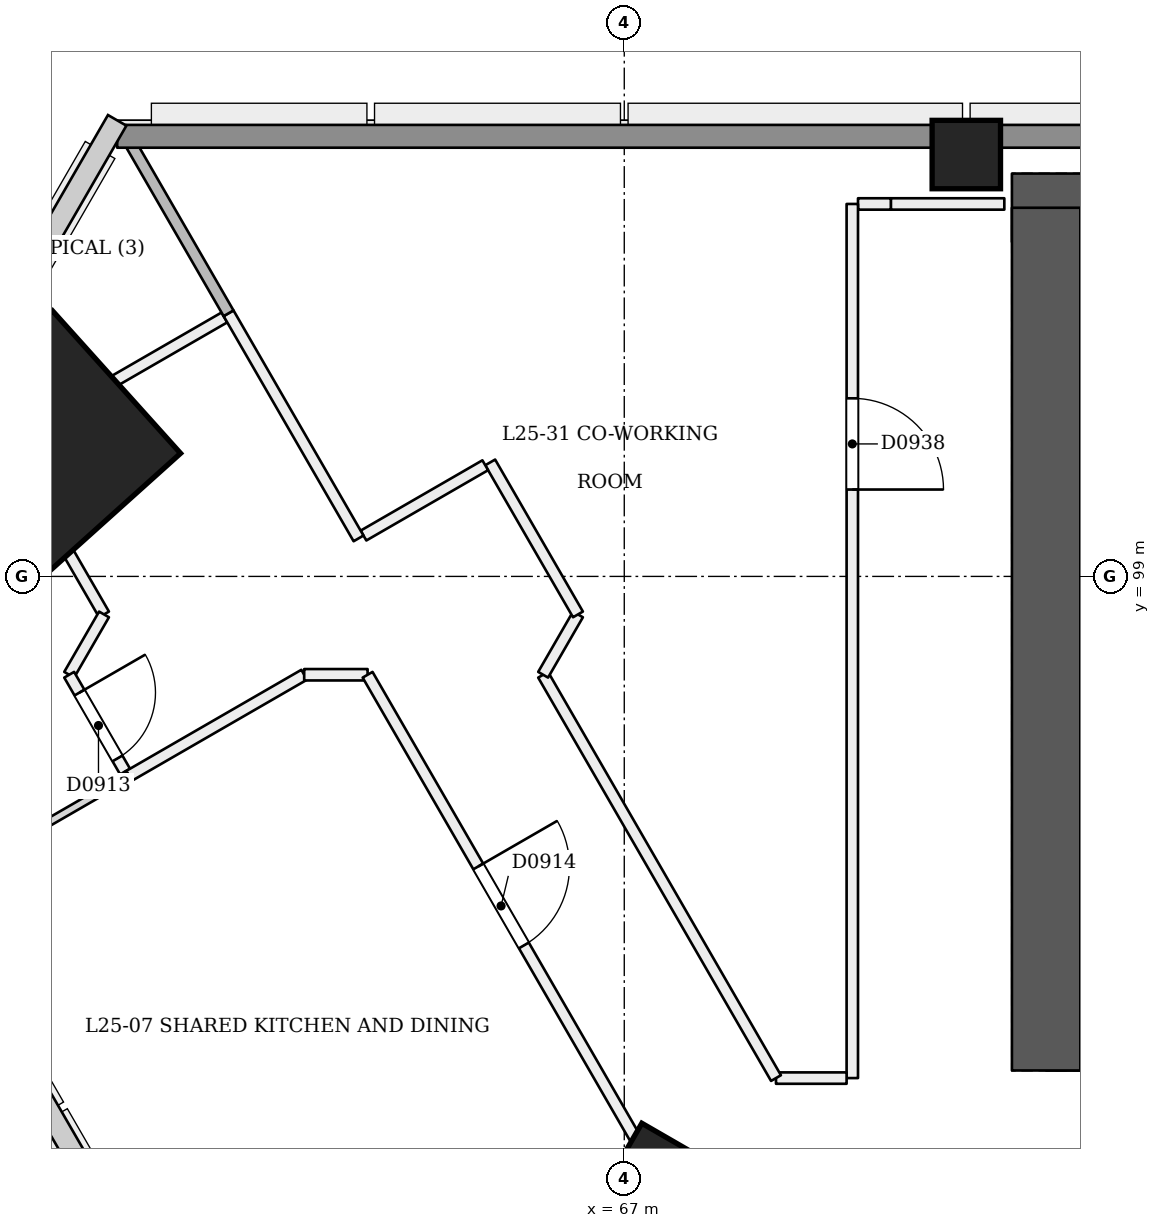
"""IFC4 building model, lengths in metres.
Left out: names, types, materials, properties, quantities, classifications, styles, units other than length and angle.
Written with IfcOpenShell. Run it as: python <this file> out.ifc"""

import sys

from ifc_helpers import new_model, si_unit, direction, frame, frame_2d, origin, origin_2d, place, context, subcontext, project, spatial, rectangle, extrude, element, fill, save


model = new_model("IFC4")
c1 = context("Model", 3, precision=1e-05, world=origin(), true_north=direction((0.0, 1.0)))
c2 = subcontext(c1, "Body", "Model", "MODEL_VIEW")
j1 = project(units=[si_unit("LENGTHUNIT", "METRE"), si_unit("PLANEANGLEUNIT", "RADIAN")], contexts=[c1])
p1 = place(None, origin())
s1 = spatial("IfcSite", under=j1, at=p1, CompositionType="ELEMENT")
p2 = place(p1, origin())
s2 = spatial("IfcBuilding", under=s1, at=p2, CompositionType="ELEMENT")
p3 = place(p2, frame((0.0, 0.0, 100.8)))
s3 = spatial("IfcBuildingStorey", under=s2, at=p3, CompositionType="ELEMENT", Elevation=100.8)
p4 = place(p3, frame((72.55, 92.95, 0.0), z_axis=(0.0, 0.0, 1.0), x_axis=(1.0, 0.0, 0.0)))
e1 = element("IfcWall", 1, at=p4, inside=s3, PredefinedType="SHEAR", context=c2, shape_type="SweptSolid", body=[
    extrude(rectangle(XDim=25.35, YDim=0.9, at=frame_2d((12.675, 0.0))), origin(), (0.0, 0.0, 1.0), 3.6),
])
p5 = place(p4, frame((1.25, 0.0, 0.0)))
e2 = element("IfcOpeningElement", 2, at=p5, cuts=e1, PredefinedType="OPENING", context=c2, shape_type="SweptSolid", body=[
    extrude(rectangle(XDim=1.2, YDim=2.1, at=frame_2d((0.6, 1.05))), frame((0.0, 0.46, 0.0), z_axis=(0.0, -1.0, 0.0), x_axis=(1.0, 0.0, 0.0)), (0.0, 0.0, 1.0), 0.921),
])
p6 = place(p4, frame((3.45, 0.0, 0.0)))
e3 = element("IfcOpeningElement", 3, at=p6, cuts=e1, PredefinedType="OPENING", context=c2, shape_type="SweptSolid", body=[
    extrude(rectangle(XDim=1.2, YDim=2.1, at=frame_2d((0.6, 1.05))), frame((0.0, 0.46, 0.0), z_axis=(0.0, -1.0, 0.0), x_axis=(1.0, 0.0, 0.0)), (0.0, 0.0, 1.0), 0.921),
])
p7 = place(p4, frame((13.45, 0.0, 0.0)))
e4 = element("IfcOpeningElement", 4, at=p7, cuts=e1, PredefinedType="OPENING", context=c2, shape_type="SweptSolid", body=[
    extrude(rectangle(XDim=1.2, YDim=2.1, at=frame_2d((0.6, 1.05))), frame((0.0, 0.46, 0.0), z_axis=(0.0, -1.0, 0.0), x_axis=(1.0, 0.0, 0.0)), (0.0, 0.0, 1.0), 0.921),
])
p8 = place(p4, frame((16.163, 0.0, 0.0)))
e5 = element("IfcOpeningElement", 5, at=p8, cuts=e1, PredefinedType="OPENING", context=c2, shape_type="SweptSolid", body=[
    extrude(rectangle(XDim=1.0, YDim=2.1, at=frame_2d((0.5, 1.05))), frame((0.0, 0.46, 0.0), z_axis=(0.0, -1.0, 0.0), x_axis=(1.0, 0.0, 0.0)), (0.0, 0.0, 1.0), 0.921),
])
p9 = place(p4, frame((20.05, 0.0, 0.0)))
e6 = element("IfcOpeningElement", 6, at=p9, cuts=e1, PredefinedType="OPENING", context=c2, shape_type="SweptSolid", body=[
    extrude(rectangle(XDim=1.0, YDim=2.1, at=frame_2d((0.5, 1.05))), frame((0.0, 0.46, 0.0), z_axis=(0.0, -1.0, 0.0), x_axis=(1.0, 0.0, 0.0)), (0.0, 0.0, 1.0), 0.921),
])
p10 = place(p4, frame((23.188, 0.0, 0.0)))
e7 = element("IfcOpeningElement", 7, at=p10, cuts=e1, PredefinedType="OPENING", context=c2, shape_type="SweptSolid", body=[
    extrude(rectangle(XDim=1.0, YDim=2.1, at=frame_2d((0.5, 1.05))), frame((0.0, 0.46, 0.0), z_axis=(0.0, -1.0, 0.0), x_axis=(1.0, 0.0, 0.0)), (0.0, 0.0, 1.0), 0.921),
])
p11 = place(p3, frame((97.45, 103.85, 0.0), z_axis=(0.0, 0.0, 1.0), x_axis=(-1.0, 0.0, 0.0)))
e8 = element("IfcWall", 8, at=p11, inside=s3, PredefinedType="SHEAR", context=c2, shape_type="SweptSolid", body=[
    extrude(rectangle(XDim=25.35, YDim=0.9, at=frame_2d((12.675, 0.0))), origin(), (0.0, 0.0, 1.0), 3.6),
])
p12 = place(p3, frame((72.55, 103.85, 0.0), z_axis=(0.0, 0.0, 1.0), x_axis=(0.0, -1.0, 0.0)))
e9 = element("IfcWall", 9, at=p12, inside=s3, PredefinedType="SHEAR", context=c2, shape_type="SweptSolid", body=[
    extrude(rectangle(XDim=11.35, YDim=0.9, at=frame_2d((5.675, 0.0))), origin(), (0.0, 0.0, 1.0), 3.6),
])
p13 = place(p3, frame((67.332, 91.281, -0.021), z_axis=(0.02215519141, 0.038415882353, 0.999016199807), x_axis=(-0.865364621668, -0.499668992839, 0.038405327245)))
e10 = element("IfcColumn", 10, at=p13, inside=s3, PredefinedType="COLUMN", context=c2, shape_type="SweptSolid", body=[
    extrude(rectangle(XDim=0.7, YDim=0.7, at=origin_2d()), origin(), (0.0, 0.0, 1.0), 3.604),
])
p14 = place(p3, frame((59.349, 100.703, 0.0), z_axis=(0.028403739082, 0.009219352065, 0.999554016126), x_axis=(-0.865121500753, 0.501164983388, 0.019961171317)))
e11 = element("IfcColumn", 11, at=p14, inside=s3, PredefinedType="COLUMN", context=c2, shape_type="SweptSolid", body=[
    extrude(rectangle(XDim=2.52, YDim=2.52, at=origin_2d()), origin(), (0.0, 0.0, 1.0), 3.602),
])
p15 = place(p3, frame((71.5, 104.55, 0.0), z_axis=(0.0, 0.0, 1.0), x_axis=(1.0, 0.0, 0.0)))
e12 = element("IfcColumn", 12, at=p15, inside=s3, PredefinedType="COLUMN", context=c2, shape_type="SweptSolid", body=[
    extrude(rectangle(XDim=0.9, YDim=0.9, at=origin_2d()), origin(), (0.0, 0.0, 1.0), 3.6),
])
p16 = place(p3, frame((61.739, 102.407, 0.0), z_axis=(0.0, 0.0, 1.0), x_axis=(-0.866002163101, -0.500040251884, 0.0)))
e13 = element("IfcWall", 13, at=p16, inside=s3, PredefinedType="PARTITIONING", context=c2, shape_type="SweptSolid", body=[
    extrude(rectangle(XDim=3.325, YDim=0.15, at=frame_2d((1.663, 0.0))), origin(), (0.0, 0.0, 1.0), 2.6),
])
p17 = place(p3, frame((58.897, 100.679, 0.0), z_axis=(0.0, 0.0, 1.0), x_axis=(0.500072327845, -0.865983641256, 0.0)))
e14 = element("IfcWall", 14, at=p17, inside=s3, PredefinedType="PARTITIONING", context=c2, shape_type="SweptSolid", body=[
    extrude(rectangle(XDim=2.517, YDim=0.15, at=frame_2d((1.258, 0.0))), origin(), (0.0, 0.0, 1.0), 2.6),
])
p18 = place(p3, frame((60.156, 98.5, 0.0), z_axis=(0.0, 0.0, 1.0), x_axis=(-0.500206595639, -0.865906092876, 0.0)))
e15 = element("IfcWall", 15, at=p18, inside=s3, PredefinedType="PARTITIONING", context=c2, shape_type="SweptSolid", body=[
    extrude(rectangle(XDim=0.917, YDim=0.15, at=frame_2d((0.458, 0.0))), origin(), (0.0, 0.0, 1.0), 2.6),
])
p19 = place(p3, frame((59.697, 97.706, 0.0), z_axis=(0.0, 0.0, 1.0), x_axis=(0.500048082433, -0.865997641599, 0.0)))
e16 = element("IfcWall", 16, at=p19, inside=s3, PredefinedType="PARTITIONING", context=c2, shape_type="SweptSolid", body=[
    extrude(rectangle(XDim=1.471, YDim=0.15, at=frame_2d((0.735, 0.0))), origin(), (0.0, 0.0, 1.0), 2.6),
])
p20 = place(p19, frame((0.271, 0.0, 0.0)))
e17 = element("IfcOpeningElement", 17, at=p20, cuts=e16, PredefinedType="OPENING", context=c2, shape_type="SweptSolid", body=[
    extrude(rectangle(XDim=1.0, YDim=2.1, at=frame_2d((0.5, 1.05))), frame((0.0, 0.085, 0.0), z_axis=(0.0, -1.0, 0.0), x_axis=(1.0, 0.0, 0.0)), (0.0, 0.0, 1.0), 0.171),
])
p21 = place(p3, frame((60.453, 96.357, 0.0), z_axis=(0.0, 0.0, 1.0), x_axis=(0.866012264611, 0.500022757025, 0.0)))
e18 = element("IfcWall", 18, at=p21, inside=s3, PredefinedType="PARTITIONING", context=c2, shape_type="SweptSolid", body=[
    extrude(rectangle(XDim=2.698, YDim=0.15, at=frame_2d((1.349, 0.0))), origin(), (0.0, 0.0, 1.0), 2.6),
])
p22 = place(p3, frame((62.789, 97.706, 0.0), z_axis=(0.0, 0.0, 1.0), x_axis=(1.0, 0.0, 0.0)))
e19 = element("IfcWall", 19, at=p22, inside=s3, PredefinedType="PARTITIONING", context=c2, shape_type="SweptSolid", body=[
    extrude(rectangle(XDim=0.834, YDim=0.15, at=frame_2d((0.417, 0.0))), origin(), (0.0, 0.0, 1.0), 3.1),
])
p23 = place(p3, frame((63.623, 97.706, 0.0), z_axis=(0.0, 0.0, 1.0), x_axis=(0.500000781663, -0.866024952491, 0.0)))
e20 = element("IfcWall", 20, at=p23, inside=s3, PredefinedType="PARTITIONING", context=c2, shape_type="SweptSolid", body=[
    extrude(rectangle(XDim=41.837, YDim=0.15, at=frame_2d((20.919, 0.0))), origin(), (0.0, 0.0, 1.0), 2.7),
])
p24 = place(p23, frame((2.912, 0.0, 0.0)))
e21 = element("IfcOpeningElement", 21, at=p24, cuts=e20, PredefinedType="OPENING", context=c2, shape_type="SweptSolid", body=[
    extrude(rectangle(XDim=1.2, YDim=2.1, at=frame_2d((0.6, 1.05))), frame((0.0, 0.085, 0.0), z_axis=(0.0, -1.0, 0.0), x_axis=(1.0, 0.0, 0.0)), (0.0, 0.0, 1.0), 0.171),
])
p25 = place(p23, frame((10.198, 0.0, 0.0)))
e22 = element("IfcOpeningElement", 22, at=p25, cuts=e20, PredefinedType="OPENING", context=c2, shape_type="SweptSolid", body=[
    extrude(rectangle(XDim=1.0, YDim=2.1, at=frame_2d((0.5, 1.05))), frame((0.0, 0.085, 0.0), z_axis=(0.0, -1.0, 0.0), x_axis=(1.0, 0.0, 0.0)), (0.0, 0.0, 1.0), 0.171),
])
p26 = place(p23, frame((12.523, 0.0, 0.0)))
e23 = element("IfcOpeningElement", 23, at=p26, cuts=e20, PredefinedType="OPENING", context=c2, shape_type="SweptSolid", body=[
    extrude(rectangle(XDim=1.0, YDim=2.1, at=frame_2d((0.5, 1.05))), frame((0.0, 0.085, 0.0), z_axis=(0.0, -1.0, 0.0), x_axis=(1.0, 0.0, 0.0)), (0.0, 0.0, 1.0), 0.171),
])
p27 = place(p23, frame((19.314, 0.0, 0.0)))
e24 = element("IfcOpeningElement", 24, at=p27, cuts=e20, PredefinedType="OPENING", context=c2, shape_type="SweptSolid", body=[
    extrude(rectangle(XDim=1.0, YDim=2.1, at=frame_2d((0.5, 1.05))), frame((0.0, 0.085, 0.0), z_axis=(0.0, -1.0, 0.0), x_axis=(1.0, 0.0, 0.0)), (0.0, 0.0, 1.0), 0.171),
])
p28 = place(p23, frame((21.639, 0.0, 0.0)))
e25 = element("IfcOpeningElement", 25, at=p28, cuts=e20, PredefinedType="OPENING", context=c2, shape_type="SweptSolid", body=[
    extrude(rectangle(XDim=1.0, YDim=2.1, at=frame_2d((0.5, 1.05))), frame((0.0, 0.085, 0.0), z_axis=(0.0, -1.0, 0.0), x_axis=(1.0, 0.0, 0.0)), (0.0, 0.0, 1.0), 0.171),
])
p29 = place(p23, frame((27.169, 0.0, 0.0)))
e26 = element("IfcOpeningElement", 26, at=p29, cuts=e20, PredefinedType="OPENING", context=c2, shape_type="SweptSolid", body=[
    extrude(rectangle(XDim=1.0, YDim=2.1, at=frame_2d((0.5, 1.05))), frame((0.0, 0.085, 0.0), z_axis=(0.0, -1.0, 0.0), x_axis=(1.0, 0.0, 0.0)), (0.0, 0.0, 1.0), 0.171),
])
p30 = place(p23, frame((30.523, 0.0, 0.0)))
e27 = element("IfcOpeningElement", 27, at=p30, cuts=e20, PredefinedType="OPENING", context=c2, shape_type="SweptSolid", body=[
    extrude(rectangle(XDim=1.0, YDim=2.1, at=frame_2d((0.5, 1.05))), frame((0.0, 0.085, 0.0), z_axis=(0.0, -1.0, 0.0), x_axis=(1.0, 0.0, 0.0)), (0.0, 0.0, 1.0), 0.171),
])
p31 = place(p23, frame((37.725, 0.0, 0.0)))
e28 = element("IfcOpeningElement", 28, at=p31, cuts=e20, PredefinedType="OPENING", context=c2, shape_type="SweptSolid", body=[
    extrude(rectangle(XDim=1.2, YDim=2.1, at=frame_2d((0.6, 1.05))), frame((0.0, 0.085, 0.0), z_axis=(0.0, -1.0, 0.0), x_axis=(1.0, 0.0, 0.0)), (0.0, 0.0, 1.0), 0.171),
])
p32 = place(p3, frame((72.0, 103.9, 0.0), z_axis=(0.0, 0.0, 1.0), x_axis=(-1.0, 0.0, 0.0)))
e29 = element("IfcWall", 29, at=p32, inside=s3, PredefinedType="PARTITIONING", context=c2, shape_type="SweptSolid", body=[
    extrude(rectangle(XDim=1.493, YDim=0.15, at=frame_2d((0.747, 0.0))), origin(), (0.0, 0.0, 1.0), 3.1),
])
p33 = place(p3, frame((70.507, 103.9, 0.0), z_axis=(0.0, 0.0, 1.0), x_axis=(-1.0, 0.0, 0.0)))
e30 = element("IfcWall", 30, at=p33, inside=s3, PredefinedType="PARTITIONING", context=c2, shape_type="SweptSolid", body=[
    extrude(rectangle(XDim=0.432, YDim=0.15, at=frame_2d((0.216, 0.0))), origin(), (0.0, 0.0, 1.0), 2.6),
])
p34 = place(p3, frame((70.0, 103.9, 0.0), z_axis=(0.0, 0.0, 1.0), x_axis=(0.0, -1.0, 0.0)))
e31 = element("IfcWall", 31, at=p34, inside=s3, PredefinedType="PARTITIONING", context=c2, shape_type="SweptSolid", body=[
    extrude(rectangle(XDim=11.5, YDim=0.15, at=frame_2d((5.75, 0.0))), origin(), (0.0, 0.0, 1.0), 2.6),
])
p35 = place(p34, frame((2.557, 0.0, 0.0)))
e32 = element("IfcOpeningElement", 32, at=p35, cuts=e31, PredefinedType="OPENING", context=c2, shape_type="SweptSolid", body=[
    extrude(rectangle(XDim=1.2, YDim=2.1, at=frame_2d((0.6, 1.05))), frame((0.0, 0.085, 0.0), z_axis=(0.0, -1.0, 0.0), x_axis=(1.0, 0.0, 0.0)), (0.0, 0.0, 1.0), 0.171),
])
p36 = place(p3, frame((69.925, 92.4, 0.0), z_axis=(0.0, 0.0, 1.0), x_axis=(-1.0, 0.0, 0.0)))
e33 = element("IfcWall", 33, at=p36, inside=s3, PredefinedType="PARTITIONING", context=c2, shape_type="SweptSolid", body=[
    extrude(rectangle(XDim=0.929, YDim=0.15, at=frame_2d((0.464, 0.0))), origin(), (0.0, 0.0, 1.0), 3.1),
])
p37 = place(p3, frame((68.996, 92.4, 0.0), z_axis=(0.0, 0.0, 1.0), x_axis=(-0.499978838982, 0.866037620759, 0.0)))
e34 = element("IfcWall", 34, at=p37, inside=s3, PredefinedType="PARTITIONING", context=c2, shape_type="SweptSolid", body=[
    extrude(rectangle(XDim=6.127, YDim=0.15, at=frame_2d((3.063, 0.0))), origin(), (0.0, 0.0, 1.0), 3.1),
])
p38 = place(p3, frame((65.933, 97.706, 0.0), z_axis=(0.0, 0.0, 1.0), x_axis=(0.500006847747, 0.8660214502, 0.0)))
e35 = element("IfcWall", 35, at=p38, inside=s3, PredefinedType="PARTITIONING", context=c2, shape_type="SweptSolid", body=[
    extrude(rectangle(XDim=0.917, YDim=0.15, at=frame_2d((0.458, 0.0))), origin(), (0.0, 0.0, 1.0), 3.1),
])
p39 = place(p3, frame((66.391, 98.5, 0.0), z_axis=(0.0, 0.0, 1.0), x_axis=(-0.500027479704, 0.866009537788, 0.0)))
e36 = element("IfcWall", 36, at=p39, inside=s3, PredefinedType="PARTITIONING", context=c2, shape_type="SweptSolid", body=[
    extrude(rectangle(XDim=2.309, YDim=0.15, at=frame_2d((1.155, 0.0))), origin(), (0.0, 0.0, 1.0), 3.1),
])
p40 = place(p3, frame((65.171, 100.462, 0.0), z_axis=(0.0, 0.0, 1.0), x_axis=(-0.866058118026, -0.49994333299, 0.0)))
e37 = element("IfcWall", 37, at=p40, inside=s3, PredefinedType="PARTITIONING", context=c2, shape_type="SweptSolid", body=[
    extrude(rectangle(XDim=1.85, YDim=0.15, at=frame_2d((0.925, 0.0))), origin(), (0.0, 0.0, 1.0), 3.1),
])
p41 = place(p3, frame((63.504, 99.5, 0.0), z_axis=(0.0, 0.0, 1.0), x_axis=(-0.50003140069, 0.866007273829, 0.0)))
e38 = element("IfcWall", 38, at=p41, inside=s3, PredefinedType="PARTITIONING", context=c2, shape_type="SweptSolid", body=[
    extrude(rectangle(XDim=3.42, YDim=0.15, at=frame_2d((1.71, 0.0))), origin(), (0.0, 0.0, 1.0), 2.6),
])
p42 = place(p3, frame((57.854, 94.857, 0.0), z_axis=(0.0, 0.0, 1.0), x_axis=(0.866068011996, 0.49992619315, 0.0)))
e39 = element("IfcWall", 39, at=p42, inside=s3, PredefinedType="PARTITIONING", context=c2, shape_type="SweptSolid", body=[
    extrude(rectangle(XDim=2.628, YDim=0.1, at=frame_2d((1.314, 0.0))), origin(), (0.0, 0.0, 1.0), 3.1),
])
p43 = place(p3, frame((60.13, 96.171, 0.0), z_axis=(0.0, 0.0, 1.0), x_axis=(0.865790956991, 0.500405854075, 0.0)))
e40 = element("IfcWall", 40, at=p43, inside=s3, PredefinedType="PARTITIONING", context=c2, shape_type="SweptSolid", body=[
    extrude(rectangle(XDim=0.412, YDim=0.1, at=frame_2d((0.206, 0.0))), origin(), (0.0, 0.0, 1.0), 2.6),
])
p44 = place(p3, frame((61.794, 102.462, 0.0), z_axis=(0.0, 0.0, 1.0), x_axis=(-0.49997269499, 0.866041167766, 0.0)))
e41 = element("IfcWall", 41, at=p44, inside=s3, PredefinedType="PARTITIONING", context=c2, shape_type="SweptSolid", body=[
    extrude(rectangle(XDim=2.815, YDim=0.15, at=frame_2d((1.408, 0.0))), origin(), (0.0, 0.0, 1.0), 3.1),
])
p45 = place(p3, frame((60.329, 104.79, 0.0), z_axis=(0.0, 0.0, 1.0), x_axis=(1.0, 0.0, 0.0)))
e42 = element("IfcWall", 42, at=p45, inside=s3, PredefinedType="SOLIDWALL", context=c2, shape_type="SweptSolid", body=[
    extrude(rectangle(XDim=49.343, YDim=0.3, at=frame_2d((24.671, 0.0))), origin(), (0.0, 0.0, 1.0), 2.6),
])
p46 = place(p20, origin())
e43 = element("IfcDoor", 43, at=p46, inside=s3, OperationType="SINGLE_SWING_LEFT", PredefinedType="NOTDEFINED", context=c2, shape_type="SweptSolid", body=[
    extrude(rectangle(XDim=1.0, YDim=2.1, at=frame_2d((0.5, 1.05))), frame((0.0, 0.025, 0.0), z_axis=(0.0, -1.0, 0.0), x_axis=(1.0, 0.0, 0.0)), (0.0, 0.0, 1.0), 0.05),
])
fill(e17, e43)
p47 = place(p24, origin())
e44 = element("IfcDoor", 44, at=p47, inside=s3, OperationType="SINGLE_SWING_LEFT", PredefinedType="NOTDEFINED", context=c2, shape_type="SweptSolid", body=[
    extrude(rectangle(XDim=1.2, YDim=2.1, at=frame_2d((0.6, 1.05))), frame((0.0, 0.025, 0.0), z_axis=(0.0, -1.0, 0.0), x_axis=(1.0, 0.0, 0.0)), (0.0, 0.0, 1.0), 0.05),
])
fill(e21, e44)
p48 = place(p35, origin())
e45 = element("IfcDoor", 45, at=p48, inside=s3, OperationType="SINGLE_SWING_RIGHT", PredefinedType="NOTDEFINED", context=c2, shape_type="SweptSolid", body=[
    extrude(rectangle(XDim=1.2, YDim=2.1, at=frame_2d((0.6, 1.05))), frame((0.0, 0.025, 0.0), z_axis=(0.0, -1.0, 0.0), x_axis=(1.0, 0.0, 0.0)), (0.0, 0.0, 1.0), 0.05),
])
fill(e32, e45)
save(model, sys.argv[1])
